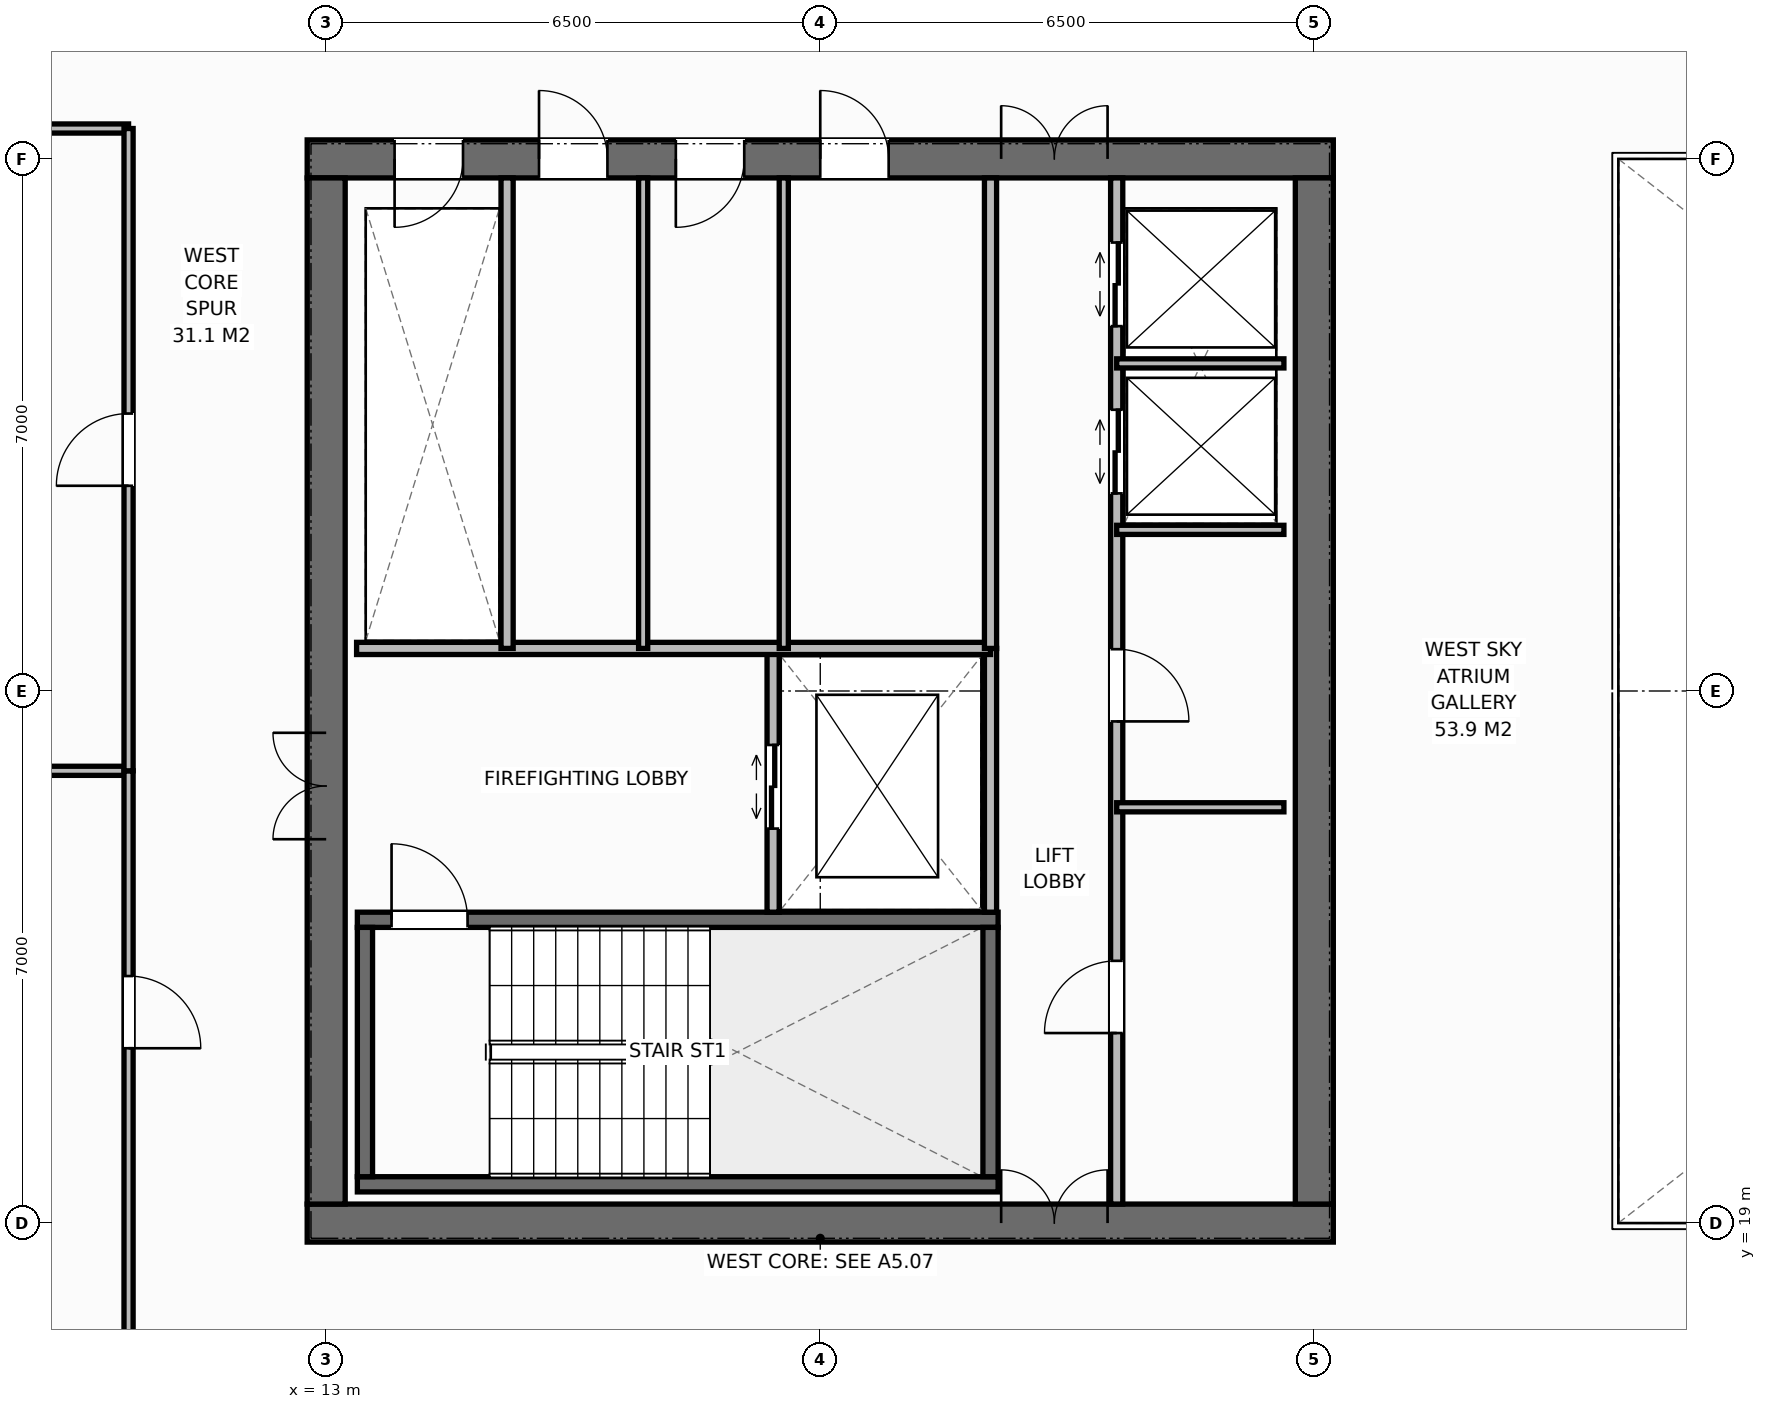
"""IFC4 building model, lengths in metres.
Left out: names, types, materials, properties, quantities, classifications, styles, units other than length and angle.
Written with IfcOpenShell. Run it as: python <this file> out.ifc"""

import sys

from ifc_helpers import new_model, si_unit, direction, frame, frame_2d, origin, place, context, subcontext, project, spatial, rectangle, extrude, element, fill, save


model = new_model("IFC4")
c1 = context("Model", 3, precision=1e-05, world=origin(), true_north=direction((0.0, 1.0)))
c2 = subcontext(c1, "Body", "Model", "MODEL_VIEW")
j1 = project(units=[si_unit("LENGTHUNIT", "METRE"), si_unit("PLANEANGLEUNIT", "RADIAN")], contexts=[c1])
p1 = place(None, origin())
s1 = spatial("IfcSite", under=j1, at=p1, CompositionType="ELEMENT")
p2 = place(p1, origin())
s2 = spatial("IfcBuilding", under=s1, at=p2, CompositionType="ELEMENT")
p3 = place(p2, frame((0.0, 0.0, 248.0)))
s3 = spatial("IfcBuildingStorey", under=s2, at=p3, CompositionType="ELEMENT", Elevation=248.0)
p4 = place(p3, frame((12.75, 19.0, 0.0), z_axis=(0.0, 0.0, 1.0), x_axis=(1.0, 0.0, 0.0)))
e1 = element("IfcWall", 1, at=p4, inside=s3, PredefinedType="SHEAR", context=c2, shape_type="SweptSolid", body=[
    extrude(rectangle(XDim=13.5, YDim=0.5, at=frame_2d((6.75, 0.0))), origin(), (0.0, 0.0, 1.0), 3.8),
])
p5 = place(p4, frame((9.13, 0.0, 0.0)))
e2 = element("IfcOpeningElement", 2, at=p5, cuts=e1, PredefinedType="OPENING", context=c2, shape_type="SweptSolid", body=[
    extrude(rectangle(XDim=1.4, YDim=2.2, at=frame_2d((0.7, 1.1))), frame((0.0, 0.26, 0.0), z_axis=(0.0, -1.0, 0.0), x_axis=(1.0, 0.0, 0.0)), (0.0, 0.0, 1.0), 0.52),
])
p6 = place(p3, frame((12.75, 33.0, 0.0), z_axis=(0.0, 0.0, 1.0), x_axis=(1.0, 0.0, 0.0)))
e3 = element("IfcWall", 3, at=p6, inside=s3, PredefinedType="SHEAR", context=c2, shape_type="SweptSolid", body=[
    extrude(rectangle(XDim=13.5, YDim=0.5, at=frame_2d((6.75, 0.0))), origin(), (0.0, 0.0, 1.0), 3.8),
])
p7 = place(p6, frame((1.15, 0.0, 0.0)))
e4 = element("IfcOpeningElement", 4, at=p7, cuts=e3, PredefinedType="OPENING", context=c2, shape_type="SweptSolid", body=[
    extrude(rectangle(XDim=0.9, YDim=2.15, at=frame_2d((0.45, 1.075))), frame((0.0, 0.26, 0.0), z_axis=(0.0, -1.0, 0.0), x_axis=(1.0, 0.0, 0.0)), (0.0, 0.0, 1.0), 0.52),
])
p8 = place(p6, frame((3.05, 0.0, 0.0)))
e5 = element("IfcOpeningElement", 5, at=p8, cuts=e3, PredefinedType="OPENING", context=c2, shape_type="SweptSolid", body=[
    extrude(rectangle(XDim=0.9, YDim=2.15, at=frame_2d((0.45, 1.075))), frame((0.0, 0.26, 0.0), z_axis=(0.0, -1.0, 0.0), x_axis=(1.0, 0.0, 0.0)), (0.0, 0.0, 1.0), 0.52),
])
p9 = place(p6, frame((4.85, 0.0, 0.0)))
e6 = element("IfcOpeningElement", 6, at=p9, cuts=e3, PredefinedType="OPENING", context=c2, shape_type="SweptSolid", body=[
    extrude(rectangle(XDim=0.9, YDim=2.15, at=frame_2d((0.45, 1.075))), frame((0.0, 0.26, 0.0), z_axis=(0.0, -1.0, 0.0), x_axis=(1.0, 0.0, 0.0)), (0.0, 0.0, 1.0), 0.52),
])
p10 = place(p6, frame((6.75, 0.0, 0.0)))
e7 = element("IfcOpeningElement", 7, at=p10, cuts=e3, PredefinedType="OPENING", context=c2, shape_type="SweptSolid", body=[
    extrude(rectangle(XDim=0.9, YDim=2.15, at=frame_2d((0.45, 1.075))), frame((0.0, 0.26, 0.0), z_axis=(0.0, -1.0, 0.0), x_axis=(1.0, 0.0, 0.0)), (0.0, 0.0, 1.0), 0.52),
])
p11 = place(p6, frame((9.13, 0.0, 0.0)))
e8 = element("IfcOpeningElement", 8, at=p11, cuts=e3, PredefinedType="OPENING", context=c2, shape_type="SweptSolid", body=[
    extrude(rectangle(XDim=1.4, YDim=2.2, at=frame_2d((0.7, 1.1))), frame((0.0, 0.26, 0.0), z_axis=(0.0, -1.0, 0.0), x_axis=(1.0, 0.0, 0.0)), (0.0, 0.0, 1.0), 0.52),
])
p12 = place(p3, frame((13.0, 19.25, 0.0), z_axis=(0.0, 0.0, 1.0), x_axis=(0.0, 1.0, 0.0)))
e9 = element("IfcWall", 9, at=p12, inside=s3, PredefinedType="SHEAR", context=c2, shape_type="SweptSolid", body=[
    extrude(rectangle(XDim=13.5, YDim=0.5, at=frame_2d((6.75, 0.0))), origin(), (0.0, 0.0, 1.0), 3.8),
])
p13 = place(p12, frame((4.8, 0.0, 0.0)))
e10 = element("IfcOpeningElement", 10, at=p13, cuts=e9, PredefinedType="OPENING", context=c2, shape_type="SweptSolid", body=[
    extrude(rectangle(XDim=1.4, YDim=2.2, at=frame_2d((0.7, 1.1))), frame((0.0, 0.26, 0.0), z_axis=(0.0, -1.0, 0.0), x_axis=(1.0, 0.0, 0.0)), (0.0, 0.0, 1.0), 0.52),
])
p14 = place(p3, frame((26.0, 19.25, 0.0), z_axis=(0.0, 0.0, 1.0), x_axis=(0.0, 1.0, 0.0)))
e11 = element("IfcWall", 11, at=p14, inside=s3, PredefinedType="SHEAR", context=c2, shape_type="SweptSolid", body=[
    extrude(rectangle(XDim=13.5, YDim=0.5, at=frame_2d((6.75, 0.0))), origin(), (0.0, 0.0, 1.0), 3.8),
])
p15 = place(p3, frame((13.41, 19.51, 0.0), z_axis=(0.0, 0.0, 1.0), x_axis=(1.0, 0.0, 0.0)))
e12 = element("IfcWall", 12, at=p15, inside=s3, PredefinedType="SHEAR", context=c2, shape_type="SweptSolid", body=[
    extrude(rectangle(XDim=8.43, YDim=0.2, at=frame_2d((4.215, 0.0))), origin(), (0.0, 0.0, 1.0), 3.8),
])
p16 = place(p3, frame((13.41, 22.99, 0.0), z_axis=(0.0, 0.0, 1.0), x_axis=(1.0, 0.0, 0.0)))
e13 = element("IfcWall", 13, at=p16, inside=s3, PredefinedType="SHEAR", context=c2, shape_type="SweptSolid", body=[
    extrude(rectangle(XDim=8.43, YDim=0.2, at=frame_2d((4.215, 0.0))), origin(), (0.0, 0.0, 1.0), 3.8),
])
p17 = place(p16, frame((0.45, 0.0, 0.0)))
e14 = element("IfcOpeningElement", 14, at=p17, cuts=e13, PredefinedType="OPENING", context=c2, shape_type="SweptSolid", body=[
    extrude(rectangle(XDim=1.0, YDim=2.15, at=frame_2d((0.5, 1.075))), frame((0.0, 0.11, 0.0), z_axis=(0.0, -1.0, 0.0), x_axis=(1.0, 0.0, 0.0)), (0.0, 0.0, 1.0), 0.22),
])
for number, where, z_axis, x_axis in (
    (15, (13.51, 19.61, 0.0), (0.0, 0.0, 1.0), (0.0, 1.0, 0.0)),
    (16, (21.74, 19.61, 0.0), (0.0, 0.0, 1.0), (0.0, 1.0, 0.0)),
):
    element("IfcWall", number, at=place(p3, frame(where, z_axis=z_axis, x_axis=x_axis)), inside=s3, PredefinedType="SHEAR", context=c2, shape_type="SweptSolid", body=[
        extrude(rectangle(XDim=3.28, YDim=0.2, at=frame_2d((1.64, 0.0))), origin(), (0.0, 0.0, 1.0), 3.8),
    ])
p18 = place(p3, frame((21.74, 23.09, 0.0), z_axis=(0.0, 0.0, 1.0), x_axis=(0.0, 1.0, 0.0)))
e17 = element("IfcWall", 17, at=p18, inside=s3, PredefinedType="STANDARD", context=c2, shape_type="SweptSolid", body=[
    extrude(rectangle(XDim=3.47, YDim=0.16, at=frame_2d((1.735, 0.0))), origin(), (0.0, 0.0, 1.0), 3.58),
])
p19 = place(p3, frame((18.88, 23.09, 0.0), z_axis=(0.0, 0.0, 1.0), x_axis=(0.0, 1.0, 0.0)))
e18 = element("IfcWall", 18, at=p19, inside=s3, PredefinedType="STANDARD", context=c2, shape_type="SweptSolid", body=[
    extrude(rectangle(XDim=3.47, YDim=0.16, at=frame_2d((1.735, 0.0))), origin(), (0.0, 0.0, 1.0), 3.58),
])
p20 = place(p19, frame((1.1, 0.0, 0.0)))
e19 = element("IfcOpeningElement", 19, at=p20, cuts=e18, PredefinedType="OPENING", context=c2, shape_type="SweptSolid", body=[
    extrude(rectangle(XDim=1.1, YDim=2.2, at=frame_2d((0.55, 1.1))), frame((0.0, 0.09, 0.0), z_axis=(0.0, -1.0, 0.0), x_axis=(1.0, 0.0, 0.0)), (0.0, 0.0, 1.0), 0.18),
])
p21 = place(p3, frame((13.4, 26.56, 0.0), z_axis=(0.0, 0.0, 1.0), x_axis=(1.0, 0.0, 0.0)))
e20 = element("IfcWall", 20, at=p21, inside=s3, PredefinedType="STANDARD", context=c2, shape_type="SweptSolid", body=[
    extrude(rectangle(XDim=8.34, YDim=0.16, at=frame_2d((4.17, 0.0))), origin(), (0.0, 0.0, 1.0), 3.58),
])
p22 = place(p3, frame((15.38, 26.56, 0.0), z_axis=(0.0, 0.0, 1.0), x_axis=(0.0, 1.0, 0.0)))
e21 = element("IfcWall", 21, at=p22, inside=s3, PredefinedType="STANDARD", context=c2, shape_type="SweptSolid", body=[
    extrude(rectangle(XDim=6.19, YDim=0.16, at=frame_2d((3.095, 0.0))), origin(), (0.0, 0.0, 1.0), 3.58),
])
for number, where, z_axis, x_axis in (
    (22, (17.17, 26.56, 0.0), (0.0, 0.0, 1.0), (0.0, 1.0, 0.0)),
    (23, (19.02, 26.56, 0.0), (0.0, 0.0, 1.0), (0.0, 1.0, 0.0)),
):
    element("IfcWall", number, at=place(p3, frame(where, z_axis=z_axis, x_axis=x_axis)), inside=s3, PredefinedType="PARTITIONING", context=c2, shape_type="SweptSolid", body=[
        extrude(rectangle(XDim=6.19, YDim=0.12, at=frame_2d((3.095, 0.0))), origin(), (0.0, 0.0, 1.0), 3.58),
    ])
p23 = place(p3, frame((21.74, 26.56, 0.0), z_axis=(0.0, 0.0, 1.0), x_axis=(0.0, 1.0, 0.0)))
e24 = element("IfcWall", 24, at=p23, inside=s3, PredefinedType="STANDARD", context=c2, shape_type="SweptSolid", body=[
    extrude(rectangle(XDim=6.19, YDim=0.16, at=frame_2d((3.095, 0.0))), origin(), (0.0, 0.0, 1.0), 3.58),
])
p24 = place(p3, frame((23.4, 19.25, 0.0), z_axis=(0.0, 0.0, 1.0), x_axis=(0.0, 1.0, 0.0)))
e25 = element("IfcWall", 25, at=p24, inside=s3, PredefinedType="STANDARD", context=c2, shape_type="SweptSolid", body=[
    extrude(rectangle(XDim=13.5, YDim=0.16, at=frame_2d((6.75, 0.0))), origin(), (0.0, 0.0, 1.0), 3.58),
])
p25 = place(p24, frame((2.25, 0.0, 0.0)))
e26 = element("IfcOpeningElement", 26, at=p25, cuts=e25, PredefinedType="OPENING", context=c2, shape_type="SweptSolid", body=[
    extrude(rectangle(XDim=0.95, YDim=2.15, at=frame_2d((0.475, 1.075))), frame((0.0, 0.09, 0.0), z_axis=(0.0, -1.0, 0.0), x_axis=(1.0, 0.0, 0.0)), (0.0, 0.0, 1.0), 0.18),
])
p26 = place(p24, frame((6.35, 0.0, 0.0)))
e27 = element("IfcOpeningElement", 27, at=p26, cuts=e25, PredefinedType="OPENING", context=c2, shape_type="SweptSolid", body=[
    extrude(rectangle(XDim=0.95, YDim=2.15, at=frame_2d((0.475, 1.075))), frame((0.0, 0.09, 0.0), z_axis=(0.0, -1.0, 0.0), x_axis=(1.0, 0.0, 0.0)), (0.0, 0.0, 1.0), 0.18),
])
p27 = place(p24, frame((9.35, 0.0, 0.0)))
e28 = element("IfcOpeningElement", 28, at=p27, cuts=e25, PredefinedType="OPENING", context=c2, shape_type="SweptSolid", body=[
    extrude(rectangle(XDim=1.1, YDim=2.2, at=frame_2d((0.55, 1.1))), frame((0.0, 0.09, 0.0), z_axis=(0.0, -1.0, 0.0), x_axis=(1.0, 0.0, 0.0)), (0.0, 0.0, 1.0), 0.18),
])
p28 = place(p24, frame((11.55, 0.0, 0.0)))
e29 = element("IfcOpeningElement", 29, at=p28, cuts=e25, PredefinedType="OPENING", context=c2, shape_type="SweptSolid", body=[
    extrude(rectangle(XDim=1.1, YDim=2.2, at=frame_2d((0.55, 1.1))), frame((0.0, 0.09, 0.0), z_axis=(0.0, -1.0, 0.0), x_axis=(1.0, 0.0, 0.0)), (0.0, 0.0, 1.0), 0.18),
])
for number, where, z_axis, x_axis in (
    (30, (23.4, 24.47, 0.0), (0.0, 0.0, 1.0), (1.0, 0.0, 0.0)),
    (31, (23.4, 28.12, 0.0), (0.0, 0.0, 1.0), (1.0, 0.0, 0.0)),
    (32, (23.4, 30.31, 0.0), (0.0, 0.0, 1.0), (1.0, 0.0, 0.0)),
):
    element("IfcWall", number, at=place(p3, frame(where, z_axis=z_axis, x_axis=x_axis)), inside=s3, PredefinedType="PARTITIONING", context=c2, shape_type="SweptSolid", body=[
        extrude(rectangle(XDim=2.2, YDim=0.12, at=frame_2d((1.1, 0.0))), origin(), (0.0, 0.0, 1.0), 3.58),
    ])
for number, where, z_axis, x_axis in (
    (33, (5.82, 33.4, 0.0), (0.0, 0.0, 1.0), (1.0, 0.0, 0.0)),
    (34, (5.82, 24.95, 0.0), (0.0, 0.0, 1.0), (1.0, 0.0, 0.0)),
):
    element("IfcWall", number, at=place(p3, frame(where, z_axis=z_axis, x_axis=x_axis)), inside=s3, PredefinedType="PARTITIONING", context=c2, shape_type="SweptSolid", body=[
        extrude(rectangle(XDim=4.58, YDim=0.12, at=frame_2d((2.29, 0.0))), origin(), (0.0, 0.0, 1.0), 3.58),
    ])
p29 = place(p3, frame((10.4, 16.5, 0.0), z_axis=(0.0, 0.0, 1.0), x_axis=(0.0, 1.0, 0.0)))
e35 = element("IfcWall", 35, at=p29, inside=s3, PredefinedType="PARTITIONING", context=c2, shape_type="SweptSolid", body=[
    extrude(rectangle(XDim=8.45, YDim=0.12, at=frame_2d((4.225, 0.0))), origin(), (0.0, 0.0, 1.0), 3.58),
])
p30 = place(p29, frame((4.8, 0.0, 0.0)))
e36 = element("IfcOpeningElement", 36, at=p30, cuts=e35, PredefinedType="OPENING", context=c2, shape_type="SweptSolid", body=[
    extrude(rectangle(XDim=0.95, YDim=2.15, at=frame_2d((0.475, 1.075))), frame((0.0, 0.07, 0.0), z_axis=(0.0, -1.0, 0.0), x_axis=(1.0, 0.0, 0.0)), (0.0, 0.0, 1.0), 0.14),
])
p31 = place(p3, frame((10.4, 24.95, 0.0), z_axis=(0.0, 0.0, 1.0), x_axis=(0.0, 1.0, 0.0)))
e37 = element("IfcWall", 37, at=p31, inside=s3, PredefinedType="PARTITIONING", context=c2, shape_type="SweptSolid", body=[
    extrude(rectangle(XDim=8.45, YDim=0.12, at=frame_2d((4.225, 0.0))), origin(), (0.0, 0.0, 1.0), 3.58),
])
p32 = place(p31, frame((3.75, 0.0, 0.0)))
e38 = element("IfcOpeningElement", 38, at=p32, cuts=e37, PredefinedType="OPENING", context=c2, shape_type="SweptSolid", body=[
    extrude(rectangle(XDim=0.95, YDim=2.15, at=frame_2d((0.475, 1.075))), frame((0.0, 0.07, 0.0), z_axis=(0.0, -1.0, 0.0), x_axis=(1.0, 0.0, 0.0)), (0.0, 0.0, 1.0), 0.14),
])
p33 = place(p17, origin())
e39 = element("IfcDoor", 39, at=p33, inside=s3, OperationType="SINGLE_SWING_LEFT", PredefinedType="DOOR", context=c2, shape_type="SweptSolid", body=[
    extrude(rectangle(XDim=1.0, YDim=2.15, at=frame_2d((0.5, 1.075))), frame((0.0, 0.025, 0.0), z_axis=(0.0, -1.0, 0.0), x_axis=(1.0, 0.0, 0.0)), (0.0, 0.0, 1.0), 0.05),
])
fill(e14, e39)
p34 = place(p13, origin())
e40 = element("IfcDoor", 40, at=p34, inside=s3, OperationType="DOUBLE_DOOR_SINGLE_SWING", PredefinedType="DOOR", context=c2, shape_type="SweptSolid", body=[
    extrude(rectangle(XDim=1.4, YDim=2.2, at=frame_2d((0.7, 1.1))), frame((0.0, 0.025, 0.0), z_axis=(0.0, -1.0, 0.0), x_axis=(1.0, 0.0, 0.0)), (0.0, 0.0, 1.0), 0.05),
])
fill(e10, e40)
p35 = place(p20, origin())
e41 = element("IfcDoor", 41, at=p35, inside=s3, OperationType="DOUBLE_DOOR_SLIDING", PredefinedType="DOOR", context=c2, shape_type="SweptSolid", body=[
    extrude(rectangle(XDim=1.1, YDim=2.2, at=frame_2d((0.55, 1.1))), frame((0.0, 0.025, 0.0), z_axis=(0.0, -1.0, 0.0), x_axis=(1.0, 0.0, 0.0)), (0.0, 0.0, 1.0), 0.05),
])
fill(e19, e41)
p36 = place(p7, origin())
e42 = element("IfcDoor", 42, at=p36, inside=s3, OperationType="SINGLE_SWING_RIGHT", PredefinedType="DOOR", context=c2, shape_type="SweptSolid", body=[
    extrude(rectangle(XDim=0.9, YDim=2.15, at=frame_2d((0.45, 1.075))), frame((0.0, -0.025, 0.0), z_axis=(0.0, -1.0, 0.0), x_axis=(1.0, 0.0, 0.0)), (0.0, 0.0, 1.0), 0.05),
])
fill(e4, e42)
p37 = place(p8, origin())
e43 = element("IfcDoor", 43, at=p37, inside=s3, OperationType="SINGLE_SWING_LEFT", PredefinedType="DOOR", context=c2, shape_type="SweptSolid", body=[
    extrude(rectangle(XDim=0.9, YDim=2.15, at=frame_2d((0.45, 1.075))), frame((0.0, -0.025, 0.0), z_axis=(0.0, -1.0, 0.0), x_axis=(1.0, 0.0, 0.0)), (0.0, 0.0, 1.0), 0.05),
])
fill(e5, e43)
p38 = place(p9, origin())
e44 = element("IfcDoor", 44, at=p38, inside=s3, OperationType="SINGLE_SWING_RIGHT", PredefinedType="DOOR", context=c2, shape_type="SweptSolid", body=[
    extrude(rectangle(XDim=0.9, YDim=2.15, at=frame_2d((0.45, 1.075))), frame((0.0, -0.025, 0.0), z_axis=(0.0, -1.0, 0.0), x_axis=(1.0, 0.0, 0.0)), (0.0, 0.0, 1.0), 0.05),
])
fill(e6, e44)
p39 = place(p10, origin())
e45 = element("IfcDoor", 45, at=p39, inside=s3, OperationType="SINGLE_SWING_LEFT", PredefinedType="DOOR", context=c2, shape_type="SweptSolid", body=[
    extrude(rectangle(XDim=0.9, YDim=2.15, at=frame_2d((0.45, 1.075))), frame((0.0, -0.025, 0.0), z_axis=(0.0, -1.0, 0.0), x_axis=(1.0, 0.0, 0.0)), (0.0, 0.0, 1.0), 0.05),
])
fill(e7, e45)
p40 = place(p5, origin())
e46 = element("IfcDoor", 46, at=p40, inside=s3, OperationType="DOUBLE_DOOR_SINGLE_SWING", PredefinedType="DOOR", context=c2, shape_type="SweptSolid", body=[
    extrude(rectangle(XDim=1.4, YDim=2.2, at=frame_2d((0.7, 1.1))), frame((0.0, 0.075, 0.0), z_axis=(0.0, -1.0, 0.0), x_axis=(1.0, 0.0, 0.0)), (0.0, 0.0, 1.0), 0.05),
])
fill(e2, e46)
p41 = place(p11, origin())
e47 = element("IfcDoor", 47, at=p41, inside=s3, OperationType="DOUBLE_DOOR_SINGLE_SWING", PredefinedType="DOOR", context=c2, shape_type="SweptSolid", body=[
    extrude(rectangle(XDim=1.4, YDim=2.2, at=frame_2d((0.7, 1.1))), frame((0.0, -0.025, 0.0), z_axis=(0.0, -1.0, 0.0), x_axis=(1.0, 0.0, 0.0)), (0.0, 0.0, 1.0), 0.05),
])
fill(e8, e47)
p42 = place(p25, origin())
e48 = element("IfcDoor", 48, at=p42, inside=s3, OperationType="SINGLE_SWING_LEFT", PredefinedType="DOOR", context=c2, shape_type="SweptSolid", body=[
    extrude(rectangle(XDim=0.95, YDim=2.15, at=frame_2d((0.475, 1.075))), frame((0.0, 0.025, 0.0), z_axis=(0.0, -1.0, 0.0), x_axis=(1.0, 0.0, 0.0)), (0.0, 0.0, 1.0), 0.05),
])
fill(e26, e48)
p43 = place(p26, origin())
e49 = element("IfcDoor", 49, at=p43, inside=s3, OperationType="SINGLE_SWING_RIGHT", PredefinedType="DOOR", context=c2, shape_type="SweptSolid", body=[
    extrude(rectangle(XDim=0.95, YDim=2.15, at=frame_2d((0.475, 1.075))), frame((0.0, 0.025, 0.0), z_axis=(0.0, -1.0, 0.0), x_axis=(1.0, 0.0, 0.0)), (0.0, 0.0, 1.0), 0.05),
])
fill(e27, e49)
p44 = place(p27, origin())
e50 = element("IfcDoor", 50, at=p44, inside=s3, OperationType="DOUBLE_DOOR_SLIDING", PredefinedType="DOOR", context=c2, shape_type="SweptSolid", body=[
    extrude(rectangle(XDim=1.1, YDim=2.2, at=frame_2d((0.55, 1.1))), frame((0.0, 0.025, 0.0), z_axis=(0.0, -1.0, 0.0), x_axis=(1.0, 0.0, 0.0)), (0.0, 0.0, 1.0), 0.05),
])
fill(e28, e50)
p45 = place(p28, origin())
e51 = element("IfcDoor", 51, at=p45, inside=s3, OperationType="DOUBLE_DOOR_SLIDING", PredefinedType="DOOR", context=c2, shape_type="SweptSolid", body=[
    extrude(rectangle(XDim=1.1, YDim=2.2, at=frame_2d((0.55, 1.1))), frame((0.0, 0.025, 0.0), z_axis=(0.0, -1.0, 0.0), x_axis=(1.0, 0.0, 0.0)), (0.0, 0.0, 1.0), 0.05),
])
fill(e29, e51)
p46 = place(p30, origin())
e52 = element("IfcDoor", 52, at=p46, inside=s3, OperationType="SINGLE_SWING_RIGHT", PredefinedType="DOOR", context=c2, shape_type="SweptSolid", body=[
    extrude(rectangle(XDim=0.95, YDim=2.15, at=frame_2d((0.475, 1.075))), frame((0.0, 0.025, 0.0), z_axis=(0.0, -1.0, 0.0), x_axis=(1.0, 0.0, 0.0)), (0.0, 0.0, 1.0), 0.05),
])
fill(e36, e52)
p47 = place(p32, origin())
e53 = element("IfcDoor", 53, at=p47, inside=s3, OperationType="SINGLE_SWING_LEFT", PredefinedType="DOOR", context=c2, shape_type="SweptSolid", body=[
    extrude(rectangle(XDim=0.95, YDim=2.15, at=frame_2d((0.475, 1.075))), frame((0.0, 0.025, 0.0), z_axis=(0.0, -1.0, 0.0), x_axis=(1.0, 0.0, 0.0)), (0.0, 0.0, 1.0), 0.05),
])
fill(e38, e53)
save(model, sys.argv[1])
